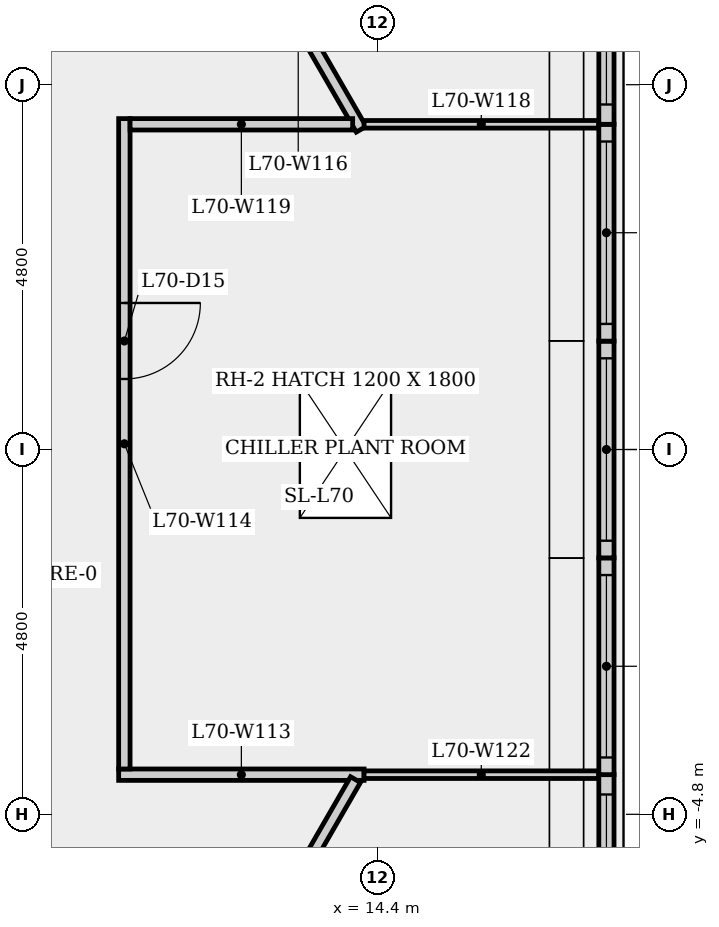
"""IFC4 building model, lengths in metres.
Left out: names, types, materials, properties, quantities, classifications, styles, units other than length and angle.
Written with IfcOpenShell. Run it as: python <this file> out.ifc"""

import sys

from ifc_helpers import new_model, si_unit, direction, frame, frame_2d, origin, origin_2d, place, context, subcontext, project, spatial, rectangle, extrude, element, fill, save


model = new_model("IFC4")
c1 = context("Model", 3, precision=1e-05, world=origin(), true_north=direction((0.0, 1.0)))
c2 = subcontext(c1, "Body", "Model", "MODEL_VIEW")
j1 = project(units=[si_unit("LENGTHUNIT", "METRE"), si_unit("PLANEANGLEUNIT", "RADIAN")], contexts=[c1])
p1 = place(None, origin())
s1 = spatial("IfcSite", under=j1, at=p1, CompositionType="ELEMENT")
p2 = place(p1, origin())
s2 = spatial("IfcBuilding", under=s1, at=p2, CompositionType="ELEMENT")
p3 = place(p2, frame((0.0, 0.0, 262.9)))
s3 = spatial("IfcBuildingStorey", under=s2, at=p3, CompositionType="ELEMENT", Elevation=262.9)
p4 = place(p3, frame((17.413, -7.2, 0.0), z_axis=(0.0, 0.0, 1.0), x_axis=(0.0, 1.0, 0.0)))
e1 = element("IfcWall", 1, at=p4, inside=s3, PredefinedType="SOLIDWALL", context=c2, shape_type="SweptSolid", body=[
    extrude(rectangle(XDim=2.922, YDim=0.2, at=frame_2d((1.461, 0.0))), origin(), (0.0, 0.0, 1.0), 4.8),
])
p5 = place(p4, frame((0.261, 0.0, 0.8)))
e2 = element("IfcOpeningElement", 2, at=p5, cuts=e1, PredefinedType="OPENING", context=c2, shape_type="SweptSolid", body=[
    extrude(rectangle(XDim=2.4, YDim=2.4, at=frame_2d((1.2, 1.2))), frame((0.0, 0.11, 0.0), z_axis=(0.0, -1.0, 0.0), x_axis=(1.0, 0.0, 0.0)), (0.0, 0.0, 1.0), 0.22),
])
p6 = place(p3, frame((17.413, -4.278, 0.0), z_axis=(0.0, 0.0, 1.0), x_axis=(0.0, 1.0, 0.0)))
e3 = element("IfcWall", 3, at=p6, inside=s3, PredefinedType="SOLIDWALL", context=c2, shape_type="SweptSolid", body=[
    extrude(rectangle(XDim=2.852, YDim=0.2, at=frame_2d((1.426, 0.0))), origin(), (0.0, 0.0, 1.0), 4.8),
])
p7 = place(p6, frame((0.226, 0.0, 0.8)))
e4 = element("IfcOpeningElement", 4, at=p7, cuts=e3, PredefinedType="OPENING", context=c2, shape_type="SweptSolid", body=[
    extrude(rectangle(XDim=2.4, YDim=2.4, at=frame_2d((1.2, 1.2))), frame((0.0, 0.11, 0.0), z_axis=(0.0, -1.0, 0.0), x_axis=(1.0, 0.0, 0.0)), (0.0, 0.0, 1.0), 0.22),
])
p8 = place(p3, frame((17.413, -1.426, 0.0), z_axis=(0.0, 0.0, 1.0), x_axis=(0.0, 1.0, 0.0)))
e5 = element("IfcWall", 5, at=p8, inside=s3, PredefinedType="SOLIDWALL", context=c2, shape_type="SweptSolid", body=[
    extrude(rectangle(XDim=2.852, YDim=0.2, at=frame_2d((1.426, 0.0))), origin(), (0.0, 0.0, 1.0), 4.8),
])
p9 = place(p8, frame((0.226, 0.0, 0.8)))
e6 = element("IfcOpeningElement", 6, at=p9, cuts=e5, PredefinedType="OPENING", context=c2, shape_type="SweptSolid", body=[
    extrude(rectangle(XDim=2.4, YDim=2.4, at=frame_2d((1.2, 1.2))), frame((0.0, 0.11, 0.0), z_axis=(0.0, -1.0, 0.0), x_axis=(1.0, 0.0, 0.0)), (0.0, 0.0, 1.0), 0.22),
])
p10 = place(p3, frame((17.413, 1.426, 0.0), z_axis=(0.0, 0.0, 1.0), x_axis=(0.0, 1.0, 0.0)))
e7 = element("IfcWall", 7, at=p10, inside=s3, PredefinedType="SOLIDWALL", context=c2, shape_type="SweptSolid", body=[
    extrude(rectangle(XDim=2.853, YDim=0.2, at=frame_2d((1.427, 0.0))), origin(), (0.0, 0.0, 1.0), 4.8),
])
p11 = place(p10, frame((0.227, 0.0, 0.8)))
e8 = element("IfcOpeningElement", 8, at=p11, cuts=e7, PredefinedType="OPENING", context=c2, shape_type="SweptSolid", body=[
    extrude(rectangle(XDim=2.4, YDim=2.4, at=frame_2d((1.2, 1.2))), frame((0.0, 0.11, 0.0), z_axis=(0.0, -1.0, 0.0), x_axis=(1.0, 0.0, 0.0)), (0.0, 0.0, 1.0), 0.22),
])
p12 = place(p3, frame((17.413, 4.279, 0.0), z_axis=(0.0, 0.0, 1.0), x_axis=(0.0, 1.0, 0.0)))
e9 = element("IfcWall", 9, at=p12, inside=s3, PredefinedType="SOLIDWALL", context=c2, shape_type="SweptSolid", body=[
    extrude(rectangle(XDim=2.921, YDim=0.2, at=frame_2d((1.461, 0.0))), origin(), (0.0, 0.0, 1.0), 4.8),
])
p13 = place(p12, frame((0.261, 0.0, 0.8)))
e10 = element("IfcOpeningElement", 10, at=p13, cuts=e9, PredefinedType="OPENING", context=c2, shape_type="SweptSolid", body=[
    extrude(rectangle(XDim=2.4, YDim=2.4, at=frame_2d((1.2, 1.2))), frame((0.0, 0.11, 0.0), z_axis=(0.0, -1.0, 0.0), x_axis=(1.0, 0.0, 0.0)), (0.0, 0.0, 1.0), 0.22),
])
p14 = place(p3, frame((10.995, -4.279, 0.0), z_axis=(0.0, 0.0, 1.0), x_axis=(1.0, 0.0, 0.0)))
e11 = element("IfcWall", 11, at=p14, inside=s3, PredefinedType="PARTITIONING", context=c2, shape_type="SweptSolid", body=[
    extrude(rectangle(XDim=3.229, YDim=0.15, at=frame_2d((1.614, 0.0))), origin(), (0.0, 0.0, 1.0), 4.5),
])
p15 = place(p3, frame((11.07, 4.354, 0.0), z_axis=(0.0, 0.0, 1.0), x_axis=(0.0, -1.0, 0.0)))
e12 = element("IfcWall", 12, at=p15, inside=s3, PredefinedType="PARTITIONING", context=c2, shape_type="SweptSolid", body=[
    extrude(rectangle(XDim=8.557, YDim=0.15, at=frame_2d((4.279, 0.0))), origin(), (0.0, 0.0, 1.0), 4.5),
])
p16 = place(p15, frame((2.426, 0.0, 0.0)))
e13 = element("IfcOpeningElement", 13, at=p16, cuts=e12, PredefinedType="OPENING", context=c2, shape_type="SweptSolid", body=[
    extrude(rectangle(XDim=1.0, YDim=2.1, at=frame_2d((0.5, 1.05))), frame((0.0, 0.085, 0.0), z_axis=(0.0, -1.0, 0.0), x_axis=(1.0, 0.0, 0.0)), (0.0, 0.0, 1.0), 0.17),
])
p17 = place(p3, frame((12.529, 7.084, 0.0), z_axis=(0.0, 0.0, 1.0), x_axis=(0.500028477648, -0.866008961582, 0.0)))
e14 = element("IfcWall", 14, at=p17, inside=s3, PredefinedType="PARTITIONING", context=c2, shape_type="SweptSolid", body=[
    extrude(rectangle(XDim=3.315, YDim=0.15, at=frame_2d((1.657, 0.0))), origin(), (0.0, 0.0, 1.0), 4.5),
])
p18 = place(p17, frame((1.103, 0.0, 0.0)))
e15 = element("IfcOpeningElement", 15, at=p18, cuts=e14, PredefinedType="OPENING", context=c2, shape_type="SweptSolid", body=[
    extrude(rectangle(XDim=1.0, YDim=2.1, at=frame_2d((0.5, 1.05))), frame((0.0, 0.085, 0.0), z_axis=(0.0, -1.0, 0.0), x_axis=(1.0, 0.0, 0.0)), (0.0, 0.0, 1.0), 0.17),
])
p19 = place(p3, frame((14.224, 4.279, 0.0), z_axis=(0.0, 0.0, 1.0), x_axis=(1.0, 0.0, 0.0)))
e16 = element("IfcWall", 16, at=p19, inside=s3, PredefinedType="PARTITIONING", context=c2, shape_type="SweptSolid", body=[
    extrude(rectangle(XDim=3.085, YDim=0.1, at=frame_2d((1.542, 0.0))), origin(), (0.0, 0.0, 1.0), 4.5),
])
p20 = place(p3, frame((14.074, 4.279, 0.0), z_axis=(0.0, 0.0, 1.0), x_axis=(-1.0, 0.0, 0.0)))
e17 = element("IfcWall", 17, at=p20, inside=s3, PredefinedType="PARTITIONING", context=c2, shape_type="SweptSolid", body=[
    extrude(rectangle(XDim=2.929, YDim=0.15, at=frame_2d((1.464, 0.0))), origin(), (0.0, 0.0, 1.0), 4.5),
])
p21 = place(p3, frame((14.111, -4.344, 0.0), z_axis=(0.0, 0.0, 1.0), x_axis=(-0.499967020646, -0.866044443586, 0.0)))
e18 = element("IfcWall", 18, at=p21, inside=s3, PredefinedType="PARTITIONING", context=c2, shape_type="SweptSolid", body=[
    extrude(rectangle(XDim=6.654, YDim=0.15, at=frame_2d((3.327, 0.0))), origin(), (0.0, 0.0, 1.0), 4.5),
])
p22 = place(p21, frame((2.827, 0.0, 0.0)))
e19 = element("IfcOpeningElement", 19, at=p22, cuts=e18, PredefinedType="OPENING", context=c2, shape_type="SweptSolid", body=[
    extrude(rectangle(XDim=1.0, YDim=2.1, at=frame_2d((0.5, 1.05))), frame((0.0, 0.085, 0.0), z_axis=(0.0, -1.0, 0.0), x_axis=(1.0, 0.0, 0.0)), (0.0, 0.0, 1.0), 0.17),
])
p23 = place(p3, frame((17.309, -4.279, 0.0), z_axis=(0.0, 0.0, 1.0), x_axis=(-1.0, 0.0, 0.0)))
e20 = element("IfcWall", 20, at=p23, inside=s3, PredefinedType="PARTITIONING", context=c2, shape_type="SweptSolid", body=[
    extrude(rectangle(XDim=3.085, YDim=0.1, at=frame_2d((1.542, 0.0))), origin(), (0.0, 0.0, 1.0), 4.5),
])
p24 = place(p5, origin())
e21 = element("IfcWindow", 21, at=p24, inside=s3, PartitioningType="SINGLE_PANEL", PredefinedType="WINDOW", context=c2, shape_type="SweptSolid", body=[
    extrude(rectangle(XDim=2.4, YDim=2.4, at=frame_2d((1.2, 1.2))), frame((0.0, 0.03, 0.0), z_axis=(0.0, -1.0, 0.0), x_axis=(1.0, 0.0, 0.0)), (0.0, 0.0, 1.0), 0.06),
])
fill(e2, e21)
p25 = place(p7, origin())
e22 = element("IfcWindow", 22, at=p25, inside=s3, PartitioningType="SINGLE_PANEL", PredefinedType="WINDOW", context=c2, shape_type="SweptSolid", body=[
    extrude(rectangle(XDim=2.4, YDim=2.4, at=frame_2d((1.2, 1.2))), frame((0.0, 0.03, 0.0), z_axis=(0.0, -1.0, 0.0), x_axis=(1.0, 0.0, 0.0)), (0.0, 0.0, 1.0), 0.06),
])
fill(e4, e22)
p26 = place(p9, origin())
e23 = element("IfcWindow", 23, at=p26, inside=s3, PartitioningType="SINGLE_PANEL", PredefinedType="WINDOW", context=c2, shape_type="SweptSolid", body=[
    extrude(rectangle(XDim=2.4, YDim=2.4, at=frame_2d((1.2, 1.2))), frame((0.0, 0.03, 0.0), z_axis=(0.0, -1.0, 0.0), x_axis=(1.0, 0.0, 0.0)), (0.0, 0.0, 1.0), 0.06),
])
fill(e6, e23)
p27 = place(p11, origin())
e24 = element("IfcWindow", 24, at=p27, inside=s3, PartitioningType="SINGLE_PANEL", PredefinedType="WINDOW", context=c2, shape_type="SweptSolid", body=[
    extrude(rectangle(XDim=2.4, YDim=2.4, at=frame_2d((1.2, 1.2))), frame((0.0, 0.03, 0.0), z_axis=(0.0, -1.0, 0.0), x_axis=(1.0, 0.0, 0.0)), (0.0, 0.0, 1.0), 0.06),
])
fill(e8, e24)
p28 = place(p13, origin())
e25 = element("IfcWindow", 25, at=p28, inside=s3, PartitioningType="SINGLE_PANEL", PredefinedType="WINDOW", context=c2, shape_type="SweptSolid", body=[
    extrude(rectangle(XDim=2.4, YDim=2.4, at=frame_2d((1.2, 1.2))), frame((0.0, 0.03, 0.0), z_axis=(0.0, -1.0, 0.0), x_axis=(1.0, 0.0, 0.0)), (0.0, 0.0, 1.0), 0.06),
])
fill(e10, e25)
p29 = place(p2, frame((0.0, 0.0, 267.7)))
p30 = place(p29, origin())
p31 = place(p30, frame((13.979, 0.0, -0.01)))
p32 = place(p31, frame((0.0, 0.0, 0.26)))
e26 = element("IfcWindow", 26, at=p32, inside=s3, PartitioningType="SINGLE_PANEL", PredefinedType="SKYLIGHT", context=c2, shape_type="SweptSolid", body=[
    extrude(rectangle(XDim=1.8, YDim=1.2, at=origin_2d()), origin(), (0.0, 0.0, 1.0), 0.05),
])
p33 = place(p16, origin())
e27 = element("IfcDoor", 27, at=p33, inside=s3, OperationType="SINGLE_SWING_LEFT", PredefinedType="DOOR", context=c2, shape_type="SweptSolid", body=[
    extrude(rectangle(XDim=1.0, YDim=2.1, at=frame_2d((0.5, 1.05))), frame((0.0, 0.025, 0.0), z_axis=(0.0, -1.0, 0.0), x_axis=(1.0, 0.0, 0.0)), (0.0, 0.0, 1.0), 0.05),
])
fill(e13, e27)
save(model, sys.argv[1])
